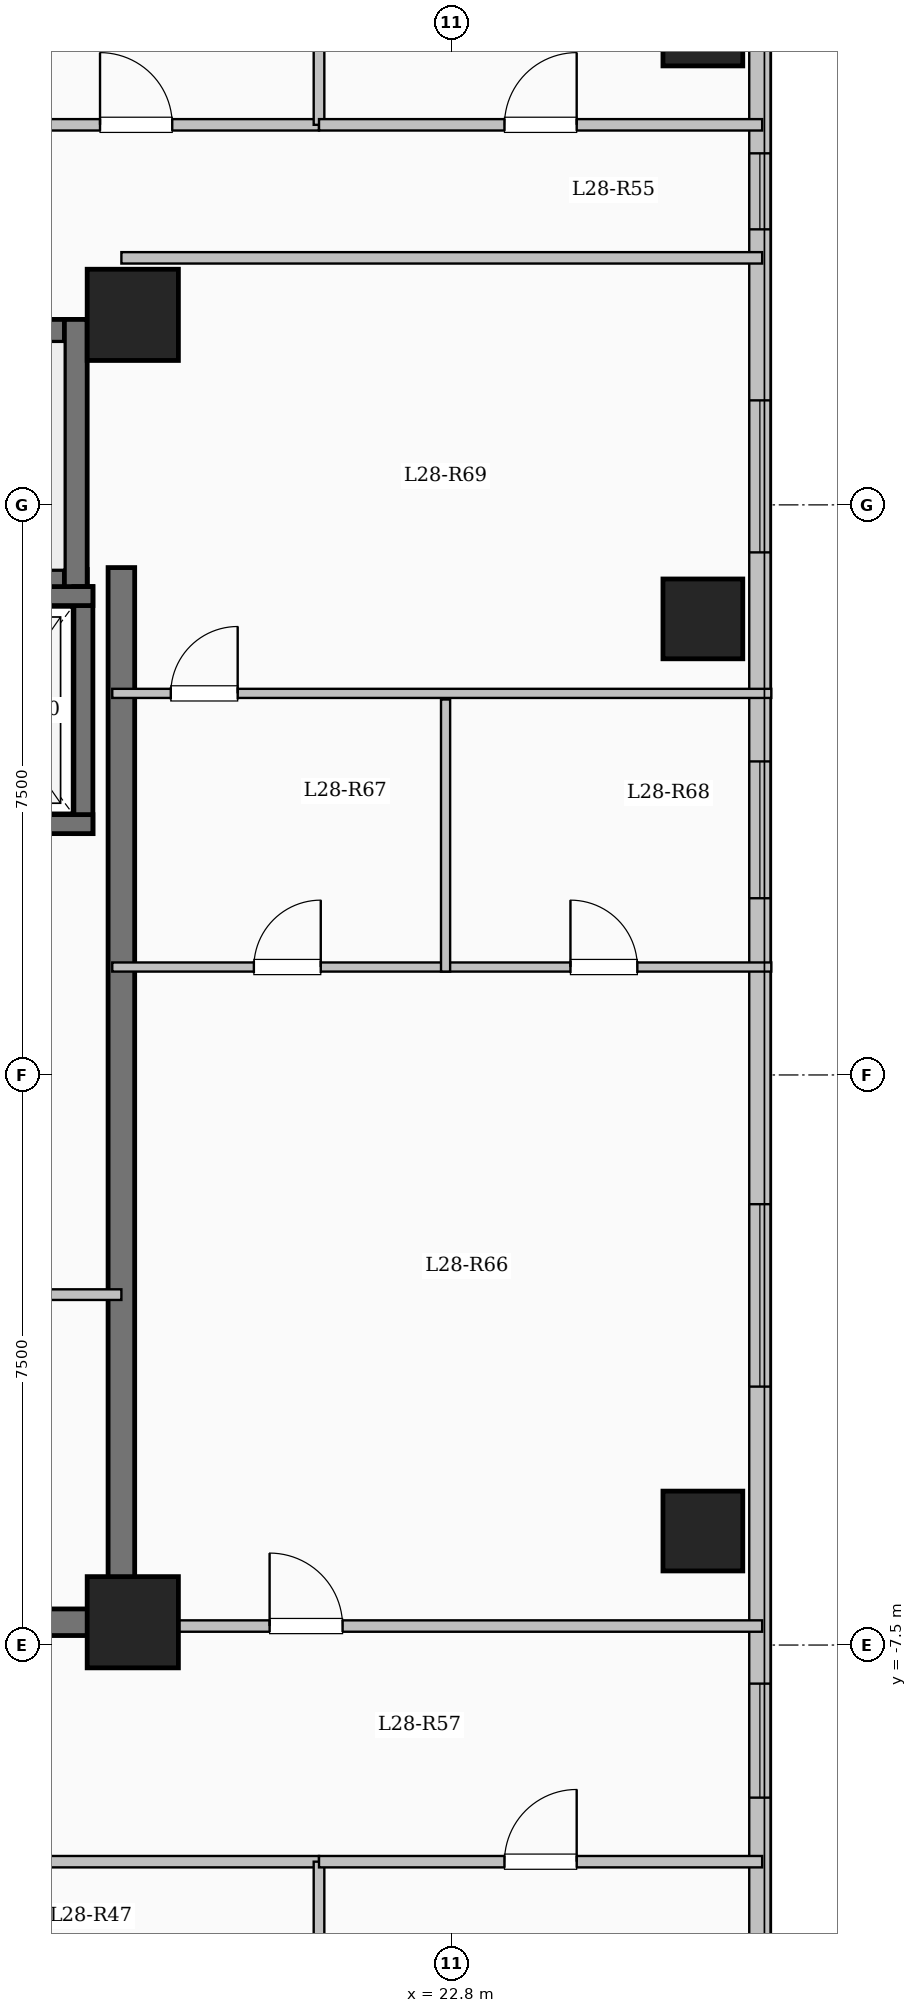
"""IFC4 building model, lengths in metres.
Left out: names, types, materials, properties, quantities, classifications, styles, units other than length and angle.
Written with IfcOpenShell. Run it as: python <this file> out.ifc"""

import sys

from ifc_helpers import new_model, si_unit, direction, frame, frame_2d, origin, origin_2d, place, context, subcontext, project, spatial, rectangle, extrude, element, fill, save


model = new_model("IFC4")
c1 = context("Model", 3, precision=1e-05, world=origin(), true_north=direction((0.0, 1.0)))
c2 = subcontext(c1, "Body", "Model", "MODEL_VIEW")
j1 = project(units=[si_unit("LENGTHUNIT", "METRE"), si_unit("PLANEANGLEUNIT", "RADIAN")], contexts=[c1])
p1 = place(None, origin())
s1 = spatial("IfcSite", under=j1, at=p1, CompositionType="ELEMENT")
p2 = place(p1, origin())
s2 = spatial("IfcBuilding", under=s1, at=p2, CompositionType="ELEMENT")
p3 = place(p2, frame((0.0, 0.0, 105.1)))
s3 = spatial("IfcBuildingStorey", under=s2, at=p3, CompositionType="ELEMENT", Elevation=105.1)
for number, where, z_axis, x_axis in (
    (1, (18.6, -7.2, 0.0), (0.0, 0.0, 1.0), (1.0, 0.0, 0.0)),
    (2, (18.6, 10.0, 0.0), (0.0, 0.0, 1.0), (1.0, 0.0, 0.0)),
):
    element("IfcColumn", number, at=place(p3, frame(where, z_axis=z_axis, x_axis=x_axis)), inside=s3, PredefinedType="COLUMN", context=c2, shape_type="SweptSolid", body=[
        extrude(rectangle(XDim=1.2, YDim=1.2, at=origin_2d()), origin(), (0.0, 0.0, 1.0), 3.35),
    ])
for number, where, z_axis, x_axis in (
    (3, (26.1, -6.0, 0.0), (0.0, 0.0, 1.0), (1.0, 0.0, 0.0)),
    (4, (26.1, 6.0, 0.0), (0.0, 0.0, 1.0), (1.0, 0.0, 0.0)),
    (5, (26.1, 13.8, 0.0), (0.0, 0.0, 1.0), (1.0, 0.0, 0.0)),
):
    element("IfcColumn", number, at=place(p3, frame(where, z_axis=z_axis, x_axis=x_axis)), inside=s3, PredefinedType="COLUMN", context=c2, shape_type="SweptSolid", body=[
        extrude(rectangle(XDim=1.05, YDim=1.05, at=origin_2d()), origin(), (0.0, 0.0, 1.0), 3.35),
    ])
p4 = place(p3, frame((26.85, 17.85, 0.0), z_axis=(0.0, 0.0, 1.0), x_axis=(0.0, -1.0, 0.0)))
e6 = element("IfcWall", 6, at=p4, inside=s3, PredefinedType="SOLIDWALL", context=c2, shape_type="SweptSolid", body=[
    extrude(rectangle(XDim=35.7, YDim=0.28, at=frame_2d((17.85, 0.0))), origin(), (0.0, 0.0, 1.0), 3.1),
])
p5 = place(p4, frame((1.675, 0.0, 0.9)))
e7 = element("IfcOpeningElement", 7, at=p5, cuts=e6, PredefinedType="OPENING", context=c2, shape_type="SweptSolid", body=[
    extrude(rectangle(XDim=2.0, YDim=1.7, at=frame_2d((1.0, 0.85))), frame((0.0, 0.15, 0.0), z_axis=(0.0, -1.0, 0.0), x_axis=(1.0, 0.0, 0.0)), (0.0, 0.0, 1.0), 0.3),
])
p6 = place(p4, frame((5.725, 0.0, 0.95)))
e8 = element("IfcOpeningElement", 8, at=p6, cuts=e6, PredefinedType="OPENING", context=c2, shape_type="SweptSolid", body=[
    extrude(rectangle(XDim=1.0, YDim=1.5, at=frame_2d((0.5, 0.75))), frame((0.0, 0.15, 0.0), z_axis=(0.0, -1.0, 0.0), x_axis=(1.0, 0.0, 0.0)), (0.0, 0.0, 1.0), 0.3),
])
p7 = place(p4, frame((8.975, 0.0, 0.9)))
e9 = element("IfcOpeningElement", 9, at=p7, cuts=e6, PredefinedType="OPENING", context=c2, shape_type="SweptSolid", body=[
    extrude(rectangle(XDim=2.0, YDim=1.7, at=frame_2d((1.0, 0.85))), frame((0.0, 0.15, 0.0), z_axis=(0.0, -1.0, 0.0), x_axis=(1.0, 0.0, 0.0)), (0.0, 0.0, 1.0), 0.3),
])
p8 = place(p4, frame((13.725, 0.0, 0.9)))
e10 = element("IfcOpeningElement", 10, at=p8, cuts=e6, PredefinedType="OPENING", context=c2, shape_type="SweptSolid", body=[
    extrude(rectangle(XDim=1.8, YDim=1.65, at=frame_2d((0.9, 0.825))), frame((0.0, 0.15, 0.0), z_axis=(0.0, -1.0, 0.0), x_axis=(1.0, 0.0, 0.0)), (0.0, 0.0, 1.0), 0.3),
])
p9 = place(p4, frame((19.55, 0.0, 0.9)))
e11 = element("IfcOpeningElement", 11, at=p9, cuts=e6, PredefinedType="OPENING", context=c2, shape_type="SweptSolid", body=[
    extrude(rectangle(XDim=2.4, YDim=1.8, at=frame_2d((1.2, 0.9))), frame((0.0, 0.15, 0.0), z_axis=(0.0, -1.0, 0.0), x_axis=(1.0, 0.0, 0.0)), (0.0, 0.0, 1.0), 0.3),
])
p10 = place(p4, frame((25.857, 0.0, 0.9)))
e12 = element("IfcOpeningElement", 12, at=p10, cuts=e6, PredefinedType="OPENING", context=c2, shape_type="SweptSolid", body=[
    extrude(rectangle(XDim=1.5, YDim=1.65, at=frame_2d((0.75, 0.825))), frame((0.0, 0.15, 0.0), z_axis=(0.0, -1.0, 0.0), x_axis=(1.0, 0.0, 0.0)), (0.0, 0.0, 1.0), 0.3),
])
p11 = place(p4, frame((30.75, 0.0, 0.9)))
e13 = element("IfcOpeningElement", 13, at=p11, cuts=e6, PredefinedType="OPENING", context=c2, shape_type="SweptSolid", body=[
    extrude(rectangle(XDim=2.4, YDim=1.8, at=frame_2d((1.2, 0.9))), frame((0.0, 0.15, 0.0), z_axis=(0.0, -1.0, 0.0), x_axis=(1.0, 0.0, 0.0)), (0.0, 0.0, 1.0), 0.3),
])
p12 = place(p3, frame((10.0, 9.79, 0.0), z_axis=(0.0, 0.0, 1.0), x_axis=(1.0, 0.0, 0.0)))
e14 = element("IfcWall", 14, at=p12, inside=s3, PredefinedType="SHEAR", context=c2, shape_type="SweptSolid", body=[
    extrude(rectangle(XDim=8.0, YDim=0.3, at=frame_2d((4.0, 0.0))), origin(), (0.0, 0.0, 1.0), 3.35),
])
p13 = place(p3, frame((10.0, 6.5, 0.0), z_axis=(0.0, 0.0, 1.0), x_axis=(1.0, 0.0, 0.0)))
e15 = element("IfcWall", 15, at=p13, inside=s3, PredefinedType="SHEAR", context=c2, shape_type="SweptSolid", body=[
    extrude(rectangle(XDim=8.0, YDim=0.3, at=frame_2d((4.0, 0.0))), origin(), (0.0, 0.0, 1.0), 3.35),
])
p14 = place(p13, frame((0.55, 0.0, 0.0)))
e16 = element("IfcOpeningElement", 16, at=p14, cuts=e15, PredefinedType="OPENING", context=c2, shape_type="SweptSolid", body=[
    extrude(rectangle(XDim=1.0, YDim=2.15, at=frame_2d((0.5, 1.075))), frame((0.0, 0.16, 0.0), z_axis=(0.0, -1.0, 0.0), x_axis=(1.0, 0.0, 0.0)), (0.0, 0.0, 1.0), 0.32),
])
p15 = place(p3, frame((17.85, 6.35, 0.0), z_axis=(0.0, 0.0, 1.0), x_axis=(0.0, 1.0, 0.0)))
e17 = element("IfcWall", 17, at=p15, inside=s3, PredefinedType="SHEAR", context=c2, shape_type="SweptSolid", body=[
    extrude(rectangle(XDim=3.59, YDim=0.3, at=frame_2d((1.795, 0.0))), origin(), (0.0, 0.0, 1.0), 3.35),
])
p16 = place(p3, frame((17.95, 3.175, 0.0), z_axis=(0.0, 0.0, 1.0), x_axis=(0.0, 1.0, 0.0)))
e18 = element("IfcWall", 18, at=p16, inside=s3, PredefinedType="SHEAR", context=c2, shape_type="SweptSolid", body=[
    extrude(rectangle(XDim=3.25, YDim=0.25, at=frame_2d((1.625, 0.0))), origin(), (0.0, 0.0, 1.0), 3.35),
])
for number, where, z_axis, x_axis in (
    (19, (15.525, 3.3, 0.0), (0.0, 0.0, 1.0), (1.0, 0.0, 0.0)),
    (20, (15.525, 6.3, 0.0), (0.0, 0.0, 1.0), (1.0, 0.0, 0.0)),
):
    element("IfcWall", number, at=place(p3, frame(where, z_axis=z_axis, x_axis=x_axis)), inside=s3, PredefinedType="SHEAR", context=c2, shape_type="SweptSolid", body=[
        extrude(rectangle(XDim=2.55, YDim=0.25, at=frame_2d((1.275, 0.0))), origin(), (0.0, 0.0, 1.0), 3.35),
    ])
p17 = place(p3, frame((18.45, -7.375, 0.0), z_axis=(0.0, 0.0, 1.0), x_axis=(0.0, 1.0, 0.0)))
e21 = element("IfcWall", 21, at=p17, inside=s3, PredefinedType="SHEAR", context=c2, shape_type="SweptSolid", body=[
    extrude(rectangle(XDim=14.05, YDim=0.35, at=frame_2d((7.025, 0.0))), origin(), (0.0, 0.0, 1.0), 3.35),
])
p18 = place(p3, frame((10.075, -7.2, 0.0), z_axis=(0.0, 0.0, 1.0), x_axis=(1.0, 0.0, 0.0)))
e22 = element("IfcWall", 22, at=p18, inside=s3, PredefinedType="SHEAR", context=c2, shape_type="SweptSolid", body=[
    extrude(rectangle(XDim=8.55, YDim=0.35, at=frame_2d((4.275, 0.0))), origin(), (0.0, 0.0, 1.0), 3.35),
])
p19 = place(p3, frame((15.4, -2.89, 0.0), z_axis=(0.0, 0.0, 1.0), x_axis=(1.0, 0.0, 0.0)))
e23 = element("IfcWall", 23, at=p19, inside=s3, PredefinedType="PARTITIONING", context=c2, shape_type="SweptSolid", body=[
    extrude(rectangle(XDim=3.05, YDim=0.14, at=frame_2d((1.525, 0.0))), origin(), (0.0, 0.0, 1.0), 3.1),
])
p20 = place(p19, frame((1.05, 0.0, 0.0)))
e24 = element("IfcOpeningElement", 24, at=p20, cuts=e23, PredefinedType="OPENING", context=c2, shape_type="SweptSolid", body=[
    extrude(rectangle(XDim=0.9, YDim=2.08, at=frame_2d((0.45, 1.04))), frame((0.0, 0.08, 0.0), z_axis=(0.0, -1.0, 0.0), x_axis=(1.0, 0.0, 0.0)), (0.0, 0.0, 1.0), 0.16),
])
p21 = place(p3, frame((3.85, 12.5, 0.0), z_axis=(0.0, 0.0, 1.0), x_axis=(1.0, 0.0, 0.0)))
e25 = element("IfcWall", 25, at=p21, inside=s3, PredefinedType="PARTITIONING", context=c2, shape_type="SweptSolid", body=[
    extrude(rectangle(XDim=17.2, YDim=0.15, at=frame_2d((8.6, 0.0))), origin(), (0.0, 0.0, 1.0), 3.1),
])
p22 = place(p21, frame((2.672, 0.0, 0.0)))
e26 = element("IfcOpeningElement", 26, at=p22, cuts=e25, PredefinedType="OPENING", context=c2, shape_type="SweptSolid", body=[
    extrude(rectangle(XDim=0.95, YDim=2.15, at=frame_2d((0.475, 1.075))), frame((0.0, 0.085, 0.0), z_axis=(0.0, -1.0, 0.0), x_axis=(1.0, 0.0, 0.0)), (0.0, 0.0, 1.0), 0.17),
])
p23 = place(p21, frame((8.837, 0.0, 0.0)))
e27 = element("IfcOpeningElement", 27, at=p23, cuts=e25, PredefinedType="OPENING", context=c2, shape_type="SweptSolid", body=[
    extrude(rectangle(XDim=0.95, YDim=2.15, at=frame_2d((0.475, 1.075))), frame((0.0, 0.085, 0.0), z_axis=(0.0, -1.0, 0.0), x_axis=(1.0, 0.0, 0.0)), (0.0, 0.0, 1.0), 0.17),
])
p24 = place(p21, frame((14.319, 0.0, 0.0)))
e28 = element("IfcOpeningElement", 28, at=p24, cuts=e25, PredefinedType="OPENING", context=c2, shape_type="SweptSolid", body=[
    extrude(rectangle(XDim=0.95, YDim=2.15, at=frame_2d((0.475, 1.075))), frame((0.0, 0.085, 0.0), z_axis=(0.0, -1.0, 0.0), x_axis=(1.0, 0.0, 0.0)), (0.0, 0.0, 1.0), 0.17),
])
p25 = place(p3, frame((8.55, -10.35, 0.0), z_axis=(0.0, 0.0, 1.0), x_axis=(1.0, 0.0, 0.0)))
e29 = element("IfcWall", 29, at=p25, inside=s3, PredefinedType="PARTITIONING", context=c2, shape_type="SweptSolid", body=[
    extrude(rectangle(XDim=12.5, YDim=0.15, at=frame_2d((6.25, 0.0))), origin(), (0.0, 0.0, 1.0), 3.1),
])
p26 = place(p25, frame((0.75, 0.0, 0.0)))
e30 = element("IfcOpeningElement", 30, at=p26, cuts=e29, PredefinedType="OPENING", context=c2, shape_type="SweptSolid", body=[
    extrude(rectangle(XDim=0.96, YDim=2.15, at=frame_2d((0.48, 1.075))), frame((0.0, 0.085, 0.0), z_axis=(0.0, -1.0, 0.0), x_axis=(1.0, 0.0, 0.0)), (0.0, 0.0, 1.0), 0.17),
])
p27 = place(p3, frame((18.45, -7.25, 0.0), z_axis=(0.0, 0.0, 1.0), x_axis=(1.0, 0.0, 0.0)))
e31 = element("IfcWall", 31, at=p27, inside=s3, PredefinedType="PARTITIONING", context=c2, shape_type="SweptSolid", body=[
    extrude(rectangle(XDim=8.43, YDim=0.15, at=frame_2d((4.215, 0.0))), origin(), (0.0, 0.0, 1.0), 3.1),
])
p28 = place(p27, frame((1.95, 0.0, 0.0)))
e32 = element("IfcOpeningElement", 32, at=p28, cuts=e31, PredefinedType="OPENING", context=c2, shape_type="SweptSolid", body=[
    extrude(rectangle(XDim=0.96, YDim=2.15, at=frame_2d((0.48, 1.075))), frame((0.0, 0.085, 0.0), z_axis=(0.0, -1.0, 0.0), x_axis=(1.0, 0.0, 0.0)), (0.0, 0.0, 1.0), 0.17),
])
p29 = place(p3, frame((18.45, 10.75, 0.0), z_axis=(0.0, 0.0, 1.0), x_axis=(1.0, 0.0, 0.0)))
e33 = element("IfcWall", 33, at=p29, inside=s3, PredefinedType="PARTITIONING", context=c2, shape_type="SweptSolid", body=[
    extrude(rectangle(XDim=8.43, YDim=0.15, at=frame_2d((4.215, 0.0))), origin(), (0.0, 0.0, 1.0), 3.1),
])
p30 = place(p3, frame((21.05, -17.85, 0.0), z_axis=(0.0, 0.0, 1.0), x_axis=(0.0, 1.0, 0.0)))
e34 = element("IfcWall", 34, at=p30, inside=s3, PredefinedType="PARTITIONING", context=c2, shape_type="SweptSolid", body=[
    extrude(rectangle(XDim=7.5, YDim=0.14, at=frame_2d((3.75, 0.0))), origin(), (0.0, 0.0, 1.0), 3.1),
])
p31 = place(p3, frame((21.05, 12.5, 0.0), z_axis=(0.0, 0.0, 1.0), x_axis=(0.0, 1.0, 0.0)))
e35 = element("IfcWall", 35, at=p31, inside=s3, PredefinedType="PARTITIONING", context=c2, shape_type="SweptSolid", body=[
    extrude(rectangle(XDim=5.35, YDim=0.14, at=frame_2d((2.675, 0.0))), origin(), (0.0, 0.0, 1.0), 3.1),
])
p32 = place(p3, frame((21.05, 12.5, 0.0), z_axis=(0.0, 0.0, 1.0), x_axis=(1.0, 0.0, 0.0)))
e36 = element("IfcWall", 36, at=p32, inside=s3, PredefinedType="PARTITIONING", context=c2, shape_type="SweptSolid", body=[
    extrude(rectangle(XDim=5.83, YDim=0.15, at=frame_2d((2.915, 0.0))), origin(), (0.0, 0.0, 1.0), 3.1),
])
p33 = place(p32, frame((2.44, 0.0, 0.0)))
e37 = element("IfcOpeningElement", 37, at=p33, cuts=e36, PredefinedType="OPENING", context=c2, shape_type="SweptSolid", body=[
    extrude(rectangle(XDim=0.95, YDim=2.15, at=frame_2d((0.475, 1.075))), frame((0.0, 0.085, 0.0), z_axis=(0.0, -1.0, 0.0), x_axis=(1.0, 0.0, 0.0)), (0.0, 0.0, 1.0), 0.17),
])
p34 = place(p3, frame((21.05, -10.35, 0.0), z_axis=(0.0, 0.0, 1.0), x_axis=(1.0, 0.0, 0.0)))
e38 = element("IfcWall", 38, at=p34, inside=s3, PredefinedType="PARTITIONING", context=c2, shape_type="SweptSolid", body=[
    extrude(rectangle(XDim=5.83, YDim=0.15, at=frame_2d((2.915, 0.0))), origin(), (0.0, 0.0, 1.0), 3.1),
])
p35 = place(p34, frame((2.44, 0.0, 0.0)))
e39 = element("IfcOpeningElement", 39, at=p35, cuts=e38, PredefinedType="OPENING", context=c2, shape_type="SweptSolid", body=[
    extrude(rectangle(XDim=0.95, YDim=2.15, at=frame_2d((0.475, 1.075))), frame((0.0, 0.085, 0.0), z_axis=(0.0, -1.0, 0.0), x_axis=(1.0, 0.0, 0.0)), (0.0, 0.0, 1.0), 0.17),
])
p36 = place(p3, frame((18.33, 1.42, 0.0), z_axis=(0.0, 0.0, 1.0), x_axis=(1.0, 0.0, 0.0)))
e40 = element("IfcWall", 40, at=p36, inside=s3, PredefinedType="PARTITIONING", context=c2, shape_type="SweptSolid", body=[
    extrude(rectangle(XDim=8.67, YDim=0.12, at=frame_2d((4.335, 0.0))), origin(), (0.0, 0.0, 1.0), 3.1),
])
p37 = place(p36, frame((1.863, 0.0, 0.0)))
e41 = element("IfcOpeningElement", 41, at=p37, cuts=e40, PredefinedType="OPENING", context=c2, shape_type="SweptSolid", body=[
    extrude(rectangle(XDim=0.88, YDim=2.1, at=frame_2d((0.44, 1.05))), frame((0.0, 0.07, 0.0), z_axis=(0.0, -1.0, 0.0), x_axis=(1.0, 0.0, 0.0)), (0.0, 0.0, 1.0), 0.14),
])
p38 = place(p36, frame((6.028, 0.0, 0.0)))
e42 = element("IfcOpeningElement", 42, at=p38, cuts=e40, PredefinedType="OPENING", context=c2, shape_type="SweptSolid", body=[
    extrude(rectangle(XDim=0.88, YDim=2.1, at=frame_2d((0.44, 1.05))), frame((0.0, 0.07, 0.0), z_axis=(0.0, -1.0, 0.0), x_axis=(1.0, 0.0, 0.0)), (0.0, 0.0, 1.0), 0.14),
])
p39 = place(p3, frame((18.33, 5.02, 0.0), z_axis=(0.0, 0.0, 1.0), x_axis=(1.0, 0.0, 0.0)))
e43 = element("IfcWall", 43, at=p39, inside=s3, PredefinedType="PARTITIONING", context=c2, shape_type="SweptSolid", body=[
    extrude(rectangle(XDim=8.67, YDim=0.12, at=frame_2d((4.335, 0.0))), origin(), (0.0, 0.0, 1.0), 3.1),
])
p40 = place(p39, frame((0.77, 0.0, 0.0)))
e44 = element("IfcOpeningElement", 44, at=p40, cuts=e43, PredefinedType="OPENING", context=c2, shape_type="SweptSolid", body=[
    extrude(rectangle(XDim=0.88, YDim=2.1, at=frame_2d((0.44, 1.05))), frame((0.0, 0.07, 0.0), z_axis=(0.0, -1.0, 0.0), x_axis=(1.0, 0.0, 0.0)), (0.0, 0.0, 1.0), 0.14),
])
p41 = place(p3, frame((22.715, 1.36, 0.0), z_axis=(0.0, 0.0, 1.0), x_axis=(0.0, 1.0, 0.0)))
e45 = element("IfcWall", 45, at=p41, inside=s3, PredefinedType="PARTITIONING", context=c2, shape_type="SweptSolid", body=[
    extrude(rectangle(XDim=3.58, YDim=0.12, at=frame_2d((1.79, 0.0))), origin(), (0.0, 0.0, 1.0), 3.1),
])
p42 = place(p6, origin())
e46 = element("IfcWindow", 46, at=p42, inside=s3, PartitioningType="SINGLE_PANEL", PredefinedType="WINDOW", context=c2, shape_type="SweptSolid", body=[
    extrude(rectangle(XDim=1.0, YDim=1.5, at=frame_2d((0.5, 0.75))), frame((0.0, 0.03, 0.0), z_axis=(0.0, -1.0, 0.0), x_axis=(1.0, 0.0, 0.0)), (0.0, 0.0, 1.0), 0.06),
])
fill(e8, e46)
p43 = place(p7, origin())
e47 = element("IfcWindow", 47, at=p43, inside=s3, PartitioningType="SINGLE_PANEL", PredefinedType="WINDOW", context=c2, shape_type="SweptSolid", body=[
    extrude(rectangle(XDim=2.0, YDim=1.7, at=frame_2d((1.0, 0.85))), frame((0.0, 0.03, 0.0), z_axis=(0.0, -1.0, 0.0), x_axis=(1.0, 0.0, 0.0)), (0.0, 0.0, 1.0), 0.06),
])
fill(e9, e47)
p44 = place(p8, origin())
e48 = element("IfcWindow", 48, at=p44, inside=s3, PartitioningType="SINGLE_PANEL", PredefinedType="WINDOW", context=c2, shape_type="SweptSolid", body=[
    extrude(rectangle(XDim=1.8, YDim=1.65, at=frame_2d((0.9, 0.825))), frame((0.0, 0.03, 0.0), z_axis=(0.0, -1.0, 0.0), x_axis=(1.0, 0.0, 0.0)), (0.0, 0.0, 1.0), 0.06),
])
fill(e10, e48)
p45 = place(p9, origin())
e49 = element("IfcWindow", 49, at=p45, inside=s3, PartitioningType="SINGLE_PANEL", PredefinedType="WINDOW", context=c2, shape_type="SweptSolid", body=[
    extrude(rectangle(XDim=2.4, YDim=1.8, at=frame_2d((1.2, 0.9))), frame((0.0, 0.03, 0.0), z_axis=(0.0, -1.0, 0.0), x_axis=(1.0, 0.0, 0.0)), (0.0, 0.0, 1.0), 0.06),
])
fill(e11, e49)
p46 = place(p10, origin())
e50 = element("IfcWindow", 50, at=p46, inside=s3, PartitioningType="SINGLE_PANEL", PredefinedType="WINDOW", context=c2, shape_type="SweptSolid", body=[
    extrude(rectangle(XDim=1.5, YDim=1.65, at=frame_2d((0.75, 0.825))), frame((0.0, 0.03, 0.0), z_axis=(0.0, -1.0, 0.0), x_axis=(1.0, 0.0, 0.0)), (0.0, 0.0, 1.0), 0.06),
])
fill(e12, e50)
p47 = place(p24, origin())
e51 = element("IfcDoor", 51, at=p47, inside=s3, OperationType="SINGLE_SWING_LEFT", PredefinedType="DOOR", context=c2, shape_type="SweptSolid", body=[
    extrude(rectangle(XDim=0.95, YDim=2.15, at=frame_2d((0.475, 1.075))), frame((0.0, 0.025, 0.0), z_axis=(0.0, -1.0, 0.0), x_axis=(1.0, 0.0, 0.0)), (0.0, 0.0, 1.0), 0.05),
])
fill(e28, e51)
p48 = place(p33, origin())
e52 = element("IfcDoor", 52, at=p48, inside=s3, OperationType="SINGLE_SWING_RIGHT", PredefinedType="DOOR", context=c2, shape_type="SweptSolid", body=[
    extrude(rectangle(XDim=0.95, YDim=2.15, at=frame_2d((0.475, 1.075))), frame((0.0, 0.025, 0.0), z_axis=(0.0, -1.0, 0.0), x_axis=(1.0, 0.0, 0.0)), (0.0, 0.0, 1.0), 0.05),
])
fill(e37, e52)
p49 = place(p35, origin())
e53 = element("IfcDoor", 53, at=p49, inside=s3, OperationType="SINGLE_SWING_RIGHT", PredefinedType="DOOR", context=c2, shape_type="SweptSolid", body=[
    extrude(rectangle(XDim=0.95, YDim=2.15, at=frame_2d((0.475, 1.075))), frame((0.0, 0.025, 0.0), z_axis=(0.0, -1.0, 0.0), x_axis=(1.0, 0.0, 0.0)), (0.0, 0.0, 1.0), 0.05),
])
fill(e39, e53)
p50 = place(p28, origin())
e54 = element("IfcDoor", 54, at=p50, inside=s3, OperationType="SINGLE_SWING_LEFT", PredefinedType="DOOR", context=c2, shape_type="SweptSolid", body=[
    extrude(rectangle(XDim=0.96, YDim=2.15, at=frame_2d((0.48, 1.075))), frame((0.0, 0.025, 0.0), z_axis=(0.0, -1.0, 0.0), x_axis=(1.0, 0.0, 0.0)), (0.0, 0.0, 1.0), 0.05),
])
fill(e32, e54)
p51 = place(p37, origin())
e55 = element("IfcDoor", 55, at=p51, inside=s3, OperationType="SINGLE_SWING_RIGHT", PredefinedType="DOOR", context=c2, shape_type="SweptSolid", body=[
    extrude(rectangle(XDim=0.88, YDim=2.1, at=frame_2d((0.44, 1.05))), frame((0.0, 0.025, 0.0), z_axis=(0.0, -1.0, 0.0), x_axis=(1.0, 0.0, 0.0)), (0.0, 0.0, 1.0), 0.05),
])
fill(e41, e55)
p52 = place(p38, origin())
e56 = element("IfcDoor", 56, at=p52, inside=s3, OperationType="SINGLE_SWING_LEFT", PredefinedType="DOOR", context=c2, shape_type="SweptSolid", body=[
    extrude(rectangle(XDim=0.88, YDim=2.1, at=frame_2d((0.44, 1.05))), frame((0.0, 0.025, 0.0), z_axis=(0.0, -1.0, 0.0), x_axis=(1.0, 0.0, 0.0)), (0.0, 0.0, 1.0), 0.05),
])
fill(e42, e56)
p53 = place(p40, origin())
e57 = element("IfcDoor", 57, at=p53, inside=s3, OperationType="SINGLE_SWING_RIGHT", PredefinedType="DOOR", context=c2, shape_type="SweptSolid", body=[
    extrude(rectangle(XDim=0.88, YDim=2.1, at=frame_2d((0.44, 1.05))), frame((0.0, 0.025, 0.0), z_axis=(0.0, -1.0, 0.0), x_axis=(1.0, 0.0, 0.0)), (0.0, 0.0, 1.0), 0.05),
])
fill(e44, e57)
save(model, sys.argv[1])
